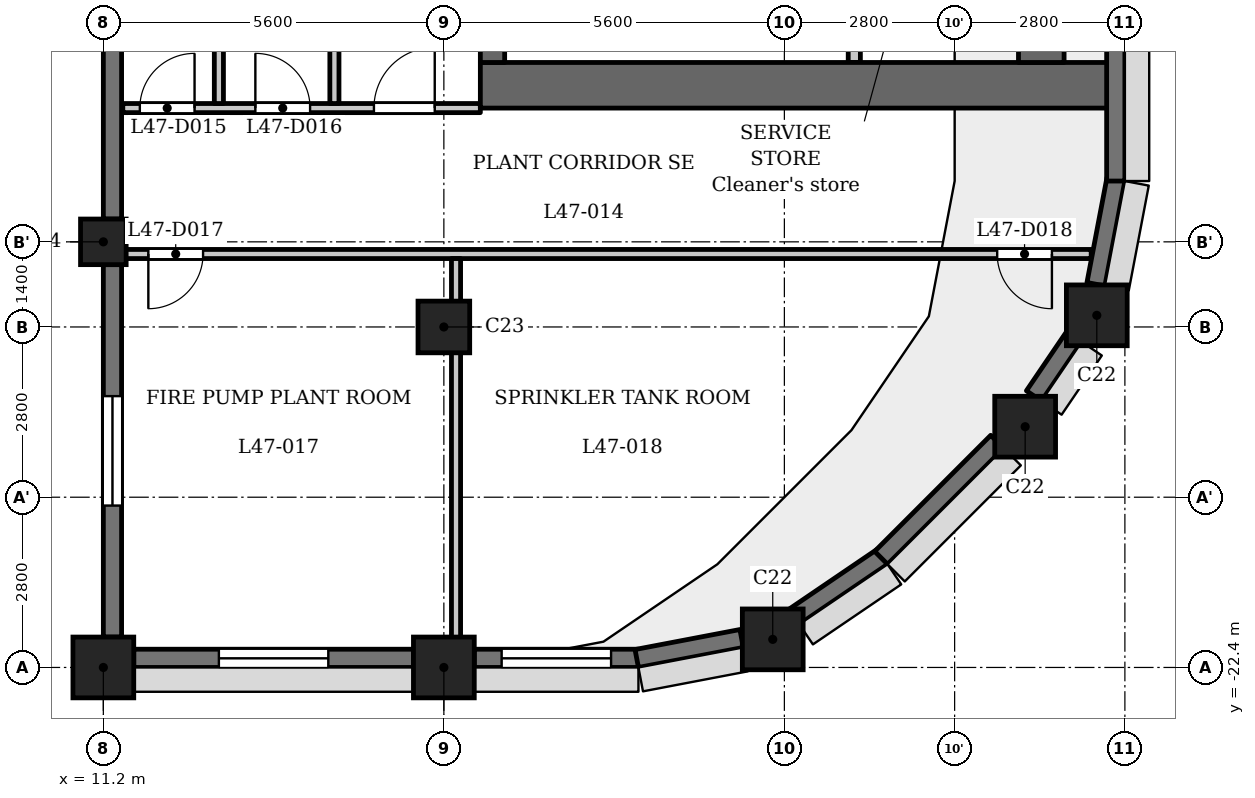
"""IFC4 building model, lengths in metres.
Left out: names, types, materials, properties, quantities, classifications, styles, units other than length and angle.
Written with IfcOpenShell. Run it as: python <this file> out.ifc"""

import sys

from ifc_helpers import new_model, si_unit, direction, frame, frame_2d, origin, origin_2d, place, context, subcontext, project, spatial, rectangle, extrude, element, fill, save


model = new_model("IFC4")
c1 = context("Model", 3, precision=1e-05, world=origin(), true_north=direction((0.0, 1.0)))
c2 = subcontext(c1, "Body", "Model", "MODEL_VIEW")
j1 = project(units=[si_unit("LENGTHUNIT", "METRE"), si_unit("PLANEANGLEUNIT", "RADIAN")], contexts=[c1])
p1 = place(None, origin())
s1 = spatial("IfcSite", under=j1, at=p1, CompositionType="ELEMENT")
p2 = place(p1, origin())
s2 = spatial("IfcBuilding", under=s1, at=p2, CompositionType="ELEMENT")
p3 = place(p2, frame((0.0, 0.0, 183.5)))
s3 = spatial("IfcBuildingStorey", under=s2, at=p3, CompositionType="ELEMENT", Elevation=183.5)
for number, where, z_axis, x_axis in (
    (1, (11.2, -22.4, 0.0), (0.0, 0.0, 1.0), (1.0, 0.0, 0.0)),
    (2, (16.8, -22.4, 0.0), (0.0, 0.0, 1.0), (1.0, 0.0, 0.0)),
    (3, (22.209, -21.938, 0.0), (0.0, 0.0, 1.0), (1.0, 0.0, 0.0)),
    (4, (26.36, -18.44, 0.0), (0.0, 0.0, 1.0), (1.0, 0.0, 0.0)),
    (5, (27.538, -16.609, 0.0), (0.0, 0.0, 1.0), (1.0, 0.0, 0.0)),
):
    element("IfcColumn", number, at=place(p3, frame(where, z_axis=z_axis, x_axis=x_axis)), inside=s3, PredefinedType="COLUMN", context=c2, shape_type="SweptSolid", body=[
        extrude(rectangle(XDim=1.0, YDim=1.0, at=origin_2d()), origin(), (0.0, 0.0, 1.0), 5.4),
    ])
p4 = place(p3, frame((16.8, -16.8, 0.0), z_axis=(0.0, 0.0, 1.0), x_axis=(1.0, 0.0, 0.0)))
e6 = element("IfcColumn", 6, at=p4, inside=s3, PredefinedType="COLUMN", context=c2, shape_type="SweptSolid", body=[
    extrude(rectangle(XDim=0.85, YDim=0.85, at=origin_2d()), origin(), (0.0, 0.0, 1.0), 5.4),
])
p5 = place(p3, frame((11.2, -15.4, 0.0), z_axis=(0.0, 0.0, 1.0), x_axis=(1.0, 0.0, 0.0)))
e7 = element("IfcColumn", 7, at=p5, inside=s3, PredefinedType="COLUMN", context=c2, shape_type="SweptSolid", body=[
    extrude(rectangle(XDim=0.75, YDim=0.75, at=origin_2d()), origin(), (0.0, 0.0, 1.0), 5.4),
])
p6 = place(p3, frame((11.35, -8.825, 0.0), z_axis=(0.0, 0.0, 1.0), x_axis=(0.0, -1.0, 0.0)))
e8 = element("IfcWall", 8, at=p6, inside=s3, PredefinedType="SOLIDWALL", context=c2, shape_type="SweptSolid", body=[
    extrude(rectangle(XDim=6.2, YDim=0.3, at=frame_2d((3.1, 0.0))), origin(), (0.0, 0.0, 1.0), 4.6),
])
p7 = place(p6, frame((1.25, 0.0, 0.9)))
e9 = element("IfcOpeningElement", 9, at=p7, cuts=e8, PredefinedType="OPENING", context=c2, shape_type="SweptSolid", body=[
    extrude(rectangle(XDim=1.8, YDim=1.5, at=frame_2d((0.9, 0.75))), frame((0.0, 0.16, 0.0), z_axis=(0.0, -1.0, 0.0), x_axis=(1.0, 0.0, 0.0)), (0.0, 0.0, 1.0), 0.32),
])
p8 = place(p3, frame((11.35, -15.775, 0.0), z_axis=(0.0, 0.0, 1.0), x_axis=(0.0, -1.0, 0.0)))
e10 = element("IfcWall", 10, at=p8, inside=s3, PredefinedType="SOLIDWALL", context=c2, shape_type="SweptSolid", body=[
    extrude(rectangle(XDim=6.125, YDim=0.3, at=frame_2d((3.062, 0.0))), origin(), (0.0, 0.0, 1.0), 4.6),
])
p9 = place(p8, frame((2.163, 0.0, 0.9)))
e11 = element("IfcOpeningElement", 11, at=p9, cuts=e10, PredefinedType="OPENING", context=c2, shape_type="SweptSolid", body=[
    extrude(rectangle(XDim=1.8, YDim=1.5, at=frame_2d((0.9, 0.75))), frame((0.0, 0.16, 0.0), z_axis=(0.0, -1.0, 0.0), x_axis=(1.0, 0.0, 0.0)), (0.0, 0.0, 1.0), 0.32),
])
p10 = place(p3, frame((11.7, -22.25, 0.0), z_axis=(0.0, 0.0, 1.0), x_axis=(1.0, 0.0, 0.0)))
e12 = element("IfcWall", 12, at=p10, inside=s3, PredefinedType="SOLIDWALL", context=c2, shape_type="SweptSolid", body=[
    extrude(rectangle(XDim=4.6, YDim=0.3, at=frame_2d((2.3, 0.0))), origin(), (0.0, 0.0, 1.0), 2.6),
])
p11 = place(p10, frame((1.4, 0.0, 0.9)))
e13 = element("IfcOpeningElement", 13, at=p11, cuts=e12, PredefinedType="OPENING", context=c2, shape_type="SweptSolid", body=[
    extrude(rectangle(XDim=1.8, YDim=1.5, at=frame_2d((0.9, 0.75))), frame((0.0, 0.16, 0.0), z_axis=(0.0, -1.0, 0.0), x_axis=(1.0, 0.0, 0.0)), (0.0, 0.0, 1.0), 0.32),
])
p12 = place(p3, frame((17.3, -22.25, 0.0), z_axis=(0.0, 0.0, 1.0), x_axis=(1.0, 0.0, 0.0)))
e14 = element("IfcWall", 14, at=p12, inside=s3, PredefinedType="SOLIDWALL", context=c2, shape_type="SweptSolid", body=[
    extrude(rectangle(XDim=2.7, YDim=0.3, at=frame_2d((1.35, 0.0))), origin(), (0.0, 0.0, 1.0), 2.6),
])
p13 = place(p12, frame((0.45, 0.0, 0.9)))
e15 = element("IfcOpeningElement", 15, at=p13, cuts=e14, PredefinedType="OPENING", context=c2, shape_type="SweptSolid", body=[
    extrude(rectangle(XDim=1.8, YDim=1.5, at=frame_2d((0.9, 0.75))), frame((0.0, 0.16, 0.0), z_axis=(0.0, -1.0, 0.0), x_axis=(1.0, 0.0, 0.0)), (0.0, 0.0, 1.0), 0.32),
])
for number, where, z_axis, x_axis in (
    (16, (19.972, -22.253, 0.0), (0.0, 0.0, 1.0), (0.982, 0.187, 0.0)),
    (17, (22.56, -21.566, 0.0), (0.0, 0.0, 1.0), (0.827, 0.562, 0.0)),
):
    element("IfcWall", number, at=place(p3, frame(where, z_axis=z_axis, x_axis=x_axis)), inside=s3, PredefinedType="SOLIDWALL", context=c2, shape_type="SweptSolid", body=[
        extrude(rectangle(XDim=1.756, YDim=0.3, at=frame_2d((0.878, 0.0))), origin(), (0.0, 0.0, 1.0), 2.6),
    ])
p14 = place(p3, frame((23.991, -20.597, 0.0), z_axis=(0.0, 0.0, 1.0), x_axis=(0.707106781187, 0.707106781187, 0.0)))
e18 = element("IfcWall", 18, at=p14, inside=s3, PredefinedType="SOLIDWALL", context=c2, shape_type="SweptSolid", body=[
    extrude(rectangle(XDim=2.7, YDim=0.3, at=frame_2d((1.35, 0.0))), origin(), (0.0, 0.0, 1.0), 2.6),
])
p15 = place(p3, frame((26.504, -17.934, 0.0), z_axis=(0.0, 0.0, 1.0), x_axis=(0.562145470373, 0.827038372833, 0.0)))
e19 = element("IfcWall", 19, at=p15, inside=s3, PredefinedType="SOLIDWALL", context=c2, shape_type="SweptSolid", body=[
    extrude(rectangle(XDim=1.177, YDim=0.3, at=frame_2d((0.588, 0.0))), origin(), (0.0, 0.0, 1.0), 4.6),
])
p16 = place(p3, frame((27.524, -16.097, 0.0), z_axis=(0.0, 0.0, 1.0), x_axis=(0.187259034321, 0.982310569049, 0.0)))
e20 = element("IfcWall", 20, at=p16, inside=s3, PredefinedType="SOLIDWALL", context=c2, shape_type="SweptSolid", body=[
    extrude(rectangle(XDim=1.756, YDim=0.3, at=frame_2d((0.878, 0.0))), origin(), (0.0, 0.0, 1.0), 2.6),
])
p17 = place(p3, frame((27.85, -14.4, 0.0), z_axis=(0.0, 0.0, 1.0), x_axis=(0.0, 1.0, 0.0)))
e21 = element("IfcWall", 21, at=p17, inside=s3, PredefinedType="SOLIDWALL", context=c2, shape_type="SweptSolid", body=[
    extrude(rectangle(XDim=2.7, YDim=0.3, at=frame_2d((1.35, 0.0))), origin(), (0.0, 0.0, 1.0), 2.6),
])
p18 = place(p3, frame((17.4, -12.825, 0.0), z_axis=(0.0, 0.0, 1.0), x_axis=(1.0, 0.0, 0.0)))
e22 = element("IfcWall", 22, at=p18, inside=s3, PredefinedType="SHEAR", context=c2, shape_type="SweptSolid", body=[
    extrude(rectangle(XDim=10.4, YDim=0.75, at=frame_2d((5.2, 0.0))), origin(), (0.0, 0.0, 1.0), 4.6),
])
p19 = place(p3, frame((17.6, -12.45, 0.0), z_axis=(0.0, 0.0, 1.0), x_axis=(0.0, 1.0, 0.0)))
e23 = element("IfcWall", 23, at=p19, inside=s3, PredefinedType="SHEAR", context=c2, shape_type="SweptSolid", body=[
    extrude(rectangle(XDim=24.9, YDim=0.4, at=frame_2d((12.45, 0.0))), origin(), (0.0, 0.0, 1.0), 4.6),
])
p20 = place(p19, frame((8.65, 0.0, 0.0)))
e24 = element("IfcOpeningElement", 24, at=p20, cuts=e23, PredefinedType="OPENING", context=c2, shape_type="SweptSolid", body=[
    extrude(rectangle(XDim=0.9, YDim=2.1, at=frame_2d((0.45, 1.05))), frame((0.0, 0.21, 0.0), z_axis=(0.0, -1.0, 0.0), x_axis=(1.0, 0.0, 0.0)), (0.0, 0.0, 1.0), 0.42),
])
p21 = place(p19, frame((15.6, 0.0, 0.0)))
e25 = element("IfcOpeningElement", 25, at=p21, cuts=e23, PredefinedType="OPENING", context=c2, shape_type="SweptSolid", body=[
    extrude(rectangle(XDim=1.1, YDim=2.1, at=frame_2d((0.55, 1.05))), frame((0.0, 0.21, 0.0), z_axis=(0.0, -1.0, 0.0), x_axis=(1.0, 0.0, 0.0)), (0.0, 0.0, 1.0), 0.42),
])
p22 = place(p19, frame((18.0, 0.0, 0.0)))
e26 = element("IfcOpeningElement", 26, at=p22, cuts=e23, PredefinedType="OPENING", context=c2, shape_type="SweptSolid", body=[
    extrude(rectangle(XDim=1.1, YDim=2.1, at=frame_2d((0.55, 1.05))), frame((0.0, 0.21, 0.0), z_axis=(0.0, -1.0, 0.0), x_axis=(1.0, 0.0, 0.0)), (0.0, 0.0, 1.0), 0.42),
])
p23 = place(p19, frame((23.025, 0.0, 0.0)))
e27 = element("IfcOpeningElement", 27, at=p23, cuts=e23, PredefinedType="OPENING", context=c2, shape_type="SweptSolid", body=[
    extrude(rectangle(XDim=1.1, YDim=2.1, at=frame_2d((0.55, 1.05))), frame((0.0, 0.21, 0.0), z_axis=(0.0, -1.0, 0.0), x_axis=(1.0, 0.0, 0.0)), (0.0, 0.0, 1.0), 0.42),
])
p24 = place(p19, frame((0.775, 0.0, 0.0)))
e28 = element("IfcOpeningElement", 28, at=p24, cuts=e23, PredefinedType="OPENING", context=c2, shape_type="SweptSolid", body=[
    extrude(rectangle(XDim=1.1, YDim=2.1, at=frame_2d((0.55, 1.05))), frame((0.0, 0.21, 0.0), z_axis=(0.0, -1.0, 0.0), x_axis=(1.0, 0.0, 0.0)), (0.0, 0.0, 1.0), 0.42),
])
p25 = place(p19, frame((12.925, 0.0, 0.0)))
e29 = element("IfcOpeningElement", 29, at=p25, cuts=e23, PredefinedType="OPENING", context=c2, shape_type="SweptSolid", body=[
    extrude(rectangle(XDim=1.8, YDim=2.1, at=frame_2d((0.9, 1.05))), frame((0.0, 0.21, 0.0), z_axis=(0.0, -1.0, 0.0), x_axis=(1.0, 0.0, 0.0)), (0.0, 0.0, 1.0), 0.42),
])
p26 = place(p3, frame((26.625, -12.45, 0.0), z_axis=(0.0, 0.0, 1.0), x_axis=(0.0, 1.0, 0.0)))
e30 = element("IfcWall", 30, at=p26, inside=s3, PredefinedType="SHEAR", context=c2, shape_type="SweptSolid", body=[
    extrude(rectangle(XDim=24.9, YDim=0.75, at=frame_2d((12.45, 0.0))), origin(), (0.0, 0.0, 1.0), 4.6),
])
p27 = place(p3, frame((23.55, -12.45, 0.0), z_axis=(0.0, 0.0, 1.0), x_axis=(0.0, 1.0, 0.0)))
e31 = element("IfcWall", 31, at=p27, inside=s3, PredefinedType="PARTITIONING", context=c2, shape_type="SweptSolid", body=[
    extrude(rectangle(XDim=2.65, YDim=0.2, at=frame_2d((1.325, 0.0))), origin(), (0.0, 0.0, 1.0), 4.6),
])
p28 = place(p27, frame((0.875, 0.0, 0.0)))
e32 = element("IfcOpeningElement", 32, at=p28, cuts=e31, PredefinedType="OPENING", context=c2, shape_type="SweptSolid", body=[
    extrude(rectangle(XDim=0.9, YDim=2.1, at=frame_2d((0.45, 1.05))), frame((0.0, 0.11, 0.0), z_axis=(0.0, -1.0, 0.0), x_axis=(1.0, 0.0, 0.0)), (0.0, 0.0, 1.0), 0.22),
])
p29 = place(p3, frame((11.29, -15.6, 0.0), z_axis=(0.0, 0.0, 1.0), x_axis=(1.0, 0.0, 0.0)))
e33 = element("IfcWall", 33, at=p29, inside=s3, PredefinedType="PARTITIONING", context=c2, shape_type="SweptSolid", body=[
    extrude(rectangle(XDim=16.156, YDim=0.15, at=frame_2d((8.078, 0.0))), origin(), (0.0, 0.0, 1.0), 4.6),
])
p30 = place(p29, frame((0.65, 0.0, 0.0)))
e34 = element("IfcOpeningElement", 34, at=p30, cuts=e33, PredefinedType="OPENING", context=c2, shape_type="SweptSolid", body=[
    extrude(rectangle(XDim=0.9, YDim=2.1, at=frame_2d((0.45, 1.05))), frame((0.0, 0.085, 0.0), z_axis=(0.0, -1.0, 0.0), x_axis=(1.0, 0.0, 0.0)), (0.0, 0.0, 1.0), 0.17),
])
p31 = place(p29, frame((14.61, 0.0, 0.0)))
e35 = element("IfcOpeningElement", 35, at=p31, cuts=e33, PredefinedType="OPENING", context=c2, shape_type="SweptSolid", body=[
    extrude(rectangle(XDim=0.9, YDim=2.1, at=frame_2d((0.45, 1.05))), frame((0.0, 0.085, 0.0), z_axis=(0.0, -1.0, 0.0), x_axis=(1.0, 0.0, 0.0)), (0.0, 0.0, 1.0), 0.17),
])
p32 = place(p3, frame((11.52, -13.2, 0.0), z_axis=(0.0, 0.0, 1.0), x_axis=(1.0, 0.0, 0.0)))
e36 = element("IfcWall", 36, at=p32, inside=s3, PredefinedType="PARTITIONING", context=c2, shape_type="SweptSolid", body=[
    extrude(rectangle(XDim=5.88, YDim=0.15, at=frame_2d((2.94, 0.0))), origin(), (0.0, 0.0, 1.0), 4.6),
])
p33 = place(p32, frame((4.13, 0.0, 0.0)))
e37 = element("IfcOpeningElement", 37, at=p33, cuts=e36, PredefinedType="OPENING", context=c2, shape_type="SweptSolid", body=[
    extrude(rectangle(XDim=1.0, YDim=2.1, at=frame_2d((0.5, 1.05))), frame((0.0, 0.085, 0.0), z_axis=(0.0, -1.0, 0.0), x_axis=(1.0, 0.0, 0.0)), (0.0, 0.0, 1.0), 0.17),
])
p34 = place(p32, frame((0.28, 0.0, 0.0)))
e38 = element("IfcOpeningElement", 38, at=p34, cuts=e36, PredefinedType="OPENING", context=c2, shape_type="SweptSolid", body=[
    extrude(rectangle(XDim=0.9, YDim=2.1, at=frame_2d((0.45, 1.05))), frame((0.0, 0.085, 0.0), z_axis=(0.0, -1.0, 0.0), x_axis=(1.0, 0.0, 0.0)), (0.0, 0.0, 1.0), 0.17),
])
p35 = place(p32, frame((2.18, 0.0, 0.0)))
e39 = element("IfcOpeningElement", 39, at=p35, cuts=e36, PredefinedType="OPENING", context=c2, shape_type="SweptSolid", body=[
    extrude(rectangle(XDim=0.9, YDim=2.1, at=frame_2d((0.45, 1.05))), frame((0.0, 0.085, 0.0), z_axis=(0.0, -1.0, 0.0), x_axis=(1.0, 0.0, 0.0)), (0.0, 0.0, 1.0), 0.17),
])
p36 = place(p3, frame((13.1, -13.125, 0.0), z_axis=(0.0, 0.0, 1.0), x_axis=(0.0, 1.0, 0.0)))
e40 = element("IfcWall", 40, at=p36, inside=s3, PredefinedType="PARTITIONING", context=c2, shape_type="SweptSolid", body=[
    extrude(rectangle(XDim=5.805, YDim=0.15, at=frame_2d((2.902, 0.0))), origin(), (0.0, 0.0, 1.0), 4.6),
])
p37 = place(p3, frame((15.0, -13.125, 0.0), z_axis=(0.0, 0.0, 1.0), x_axis=(0.0, 1.0, 0.0)))
e41 = element("IfcWall", 41, at=p37, inside=s3, PredefinedType="PARTITIONING", context=c2, shape_type="SweptSolid", body=[
    extrude(rectangle(XDim=6.356, YDim=0.15, at=frame_2d((3.178, 0.0))), origin(), (0.0, 0.0, 1.0), 4.6),
])
p38 = place(p3, frame((17.0, -22.31, 0.0), z_axis=(0.0, 0.0, 1.0), x_axis=(0.0, 1.0, 0.0)))
e42 = element("IfcWall", 42, at=p38, inside=s3, PredefinedType="PARTITIONING", context=c2, shape_type="SweptSolid", body=[
    extrude(rectangle(XDim=6.635, YDim=0.15, at=frame_2d((3.317, 0.0))), origin(), (0.0, 0.0, 1.0), 4.6),
])
p39 = place(p33, origin())
e43 = element("IfcDoor", 43, at=p39, inside=s3, OperationType="SINGLE_SWING_LEFT", PredefinedType="DOOR", context=c2, shape_type="SweptSolid", body=[
    extrude(rectangle(XDim=1.0, YDim=2.1, at=frame_2d((0.5, 1.05))), frame((0.0, 0.025, 0.0), z_axis=(0.0, -1.0, 0.0), x_axis=(1.0, 0.0, 0.0)), (0.0, 0.0, 1.0), 0.05),
])
fill(e37, e43)
p40 = place(p34, origin())
e44 = element("IfcDoor", 44, at=p40, inside=s3, OperationType="SINGLE_SWING_LEFT", PredefinedType="DOOR", context=c2, shape_type="SweptSolid", body=[
    extrude(rectangle(XDim=0.9, YDim=2.1, at=frame_2d((0.45, 1.05))), frame((0.0, 0.025, 0.0), z_axis=(0.0, -1.0, 0.0), x_axis=(1.0, 0.0, 0.0)), (0.0, 0.0, 1.0), 0.05),
])
fill(e38, e44)
p41 = place(p35, origin())
e45 = element("IfcDoor", 45, at=p41, inside=s3, OperationType="SINGLE_SWING_RIGHT", PredefinedType="DOOR", context=c2, shape_type="SweptSolid", body=[
    extrude(rectangle(XDim=0.9, YDim=2.1, at=frame_2d((0.45, 1.05))), frame((0.0, 0.025, 0.0), z_axis=(0.0, -1.0, 0.0), x_axis=(1.0, 0.0, 0.0)), (0.0, 0.0, 1.0), 0.05),
])
fill(e39, e45)
p42 = place(p30, origin())
e46 = element("IfcDoor", 46, at=p42, inside=s3, OperationType="SINGLE_SWING_LEFT", PredefinedType="DOOR", context=c2, shape_type="SweptSolid", body=[
    extrude(rectangle(XDim=0.9, YDim=2.1, at=frame_2d((0.45, 1.05))), frame((0.0, 0.025, 0.0), z_axis=(0.0, -1.0, 0.0), x_axis=(1.0, 0.0, 0.0)), (0.0, 0.0, 1.0), 0.05),
])
fill(e34, e46)
p43 = place(p31, origin())
e47 = element("IfcDoor", 47, at=p43, inside=s3, OperationType="SINGLE_SWING_RIGHT", PredefinedType="DOOR", context=c2, shape_type="SweptSolid", body=[
    extrude(rectangle(XDim=0.9, YDim=2.1, at=frame_2d((0.45, 1.05))), frame((0.0, 0.025, 0.0), z_axis=(0.0, -1.0, 0.0), x_axis=(1.0, 0.0, 0.0)), (0.0, 0.0, 1.0), 0.05),
])
fill(e35, e47)
p44 = place(p9, origin())
e48 = element("IfcWindow", 48, at=p44, inside=s3, PartitioningType="SINGLE_PANEL", PredefinedType="WINDOW", context=c2, shape_type="SweptSolid", body=[
    extrude(rectangle(XDim=1.8, YDim=1.5, at=frame_2d((0.9, 0.75))), frame((0.0, 0.03, 0.0), z_axis=(0.0, -1.0, 0.0), x_axis=(1.0, 0.0, 0.0)), (0.0, 0.0, 1.0), 0.06),
])
fill(e11, e48)
p45 = place(p11, origin())
e49 = element("IfcWindow", 49, at=p45, inside=s3, PartitioningType="SINGLE_PANEL", PredefinedType="WINDOW", context=c2, shape_type="SweptSolid", body=[
    extrude(rectangle(XDim=1.8, YDim=1.5, at=frame_2d((0.9, 0.75))), frame((0.0, 0.03, 0.0), z_axis=(0.0, -1.0, 0.0), x_axis=(1.0, 0.0, 0.0)), (0.0, 0.0, 1.0), 0.06),
])
fill(e13, e49)
p46 = place(p13, origin())
e50 = element("IfcWindow", 50, at=p46, inside=s3, PartitioningType="SINGLE_PANEL", PredefinedType="WINDOW", context=c2, shape_type="SweptSolid", body=[
    extrude(rectangle(XDim=1.8, YDim=1.5, at=frame_2d((0.9, 0.75))), frame((0.0, 0.03, 0.0), z_axis=(0.0, -1.0, 0.0), x_axis=(1.0, 0.0, 0.0)), (0.0, 0.0, 1.0), 0.06),
])
fill(e15, e50)
save(model, sys.argv[1])
